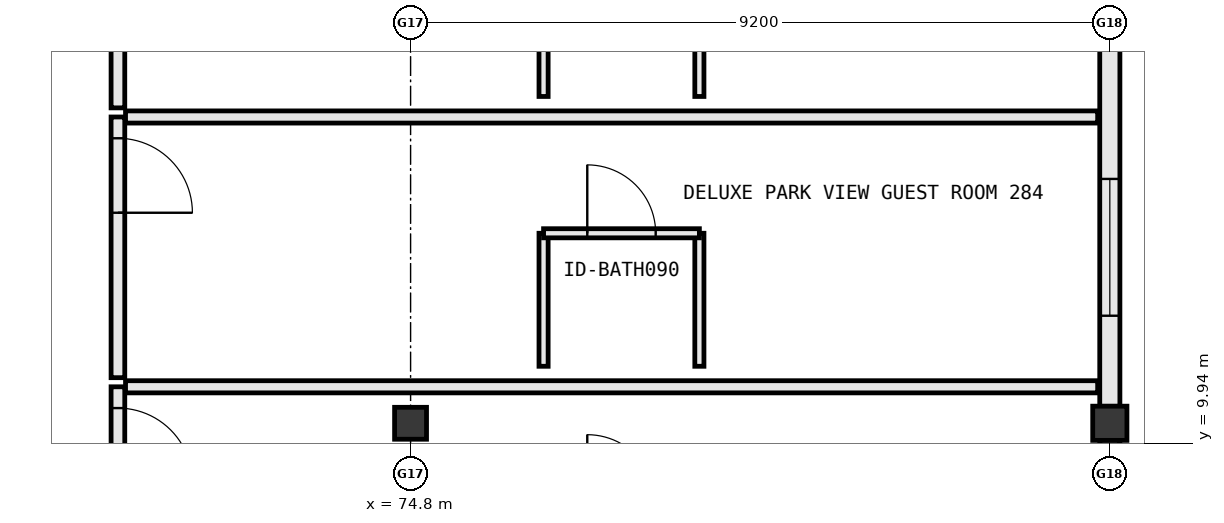
"""IFC4 building model, lengths in metres.
Left out: names, types, materials, properties, quantities, classifications, styles, units other than length and angle.
Written with IfcOpenShell. Run it as: python <this file> out.ifc"""

import sys

from ifc_helpers import new_model, si_unit, direction, frame, frame_2d, origin, origin_2d, place, context, subcontext, project, spatial, rectangle, extrude, element, fill, save


model = new_model("IFC4")
c1 = context("Model", 3, precision=1e-05, world=origin(), true_north=direction((0.0, 1.0)))
c2 = subcontext(c1, "Body", "Model", "MODEL_VIEW")
j1 = project(units=[si_unit("LENGTHUNIT", "METRE"), si_unit("PLANEANGLEUNIT", "RADIAN")], contexts=[c1])
p1 = place(None, origin())
s1 = spatial("IfcSite", under=j1, at=p1, CompositionType="ELEMENT")
p2 = place(p1, origin())
s2 = spatial("IfcBuilding", under=s1, at=p2, CompositionType="ELEMENT")
p3 = place(p2, frame((0.0, 0.0, 42.8)))
s3 = spatial("IfcBuildingStorey", under=s2, at=p3, CompositionType="ELEMENT", Elevation=42.8)
p4 = place(p3, frame((74.8, 10.2, 0.0), z_axis=(0.0, 0.0, 1.0), x_axis=(1.0, 0.0, 0.0)))
e1 = element("IfcColumn", 1, at=p4, inside=s3, PredefinedType="COLUMN", context=c2, shape_type="SweptSolid", body=[
    extrude(rectangle(XDim=0.42, YDim=0.42, at=origin_2d()), origin(), (0.0, 0.0, 1.0), 3.8),
])
p5 = place(p3, frame((84.0, 10.2, 0.0), z_axis=(0.0, 0.0, 1.0), x_axis=(1.0, 0.0, 0.0)))
e2 = element("IfcColumn", 2, at=p5, inside=s3, PredefinedType="COLUMN", context=c2, shape_type="SweptSolid", body=[
    extrude(rectangle(XDim=0.45, YDim=0.45, at=origin_2d()), origin(), (0.0, 0.0, 1.0), 3.8),
])
p6 = place(p3, frame((84.0, 0.823, 0.0), z_axis=(0.0, 0.0, 1.0), x_axis=(0.0, 1.0, 0.0)))
e3 = element("IfcWall", 3, at=p6, inside=s3, PredefinedType="STANDARD", context=c2, shape_type="SweptSolid", body=[
    extrude(rectangle(XDim=9.154, YDim=0.265, at=frame_2d((4.577, 0.0))), origin(), (0.0, 0.0, 1.0), 2.955),
])
p7 = place(p6, frame((0.479, 0.0, 0.85)))
e4 = element("IfcOpeningElement", 4, at=p7, cuts=e3, PredefinedType="OPENING", context=c2, shape_type="SweptSolid", body=[
    extrude(rectangle(XDim=1.8, YDim=1.85, at=frame_2d((0.9, 0.925))), frame((0.0, 0.145, 0.0), z_axis=(0.0, -1.0, 0.0), x_axis=(1.0, 0.0, 0.0)), (0.0, 0.0, 1.0), 0.289),
])
p8 = place(p6, frame((3.692, 0.0, 0.85)))
e5 = element("IfcOpeningElement", 5, at=p8, cuts=e3, PredefinedType="OPENING", context=c2, shape_type="SweptSolid", body=[
    extrude(rectangle(XDim=1.8, YDim=1.85, at=frame_2d((0.9, 0.925))), frame((0.0, 0.145, 0.0), z_axis=(0.0, -1.0, 0.0), x_axis=(1.0, 0.0, 0.0)), (0.0, 0.0, 1.0), 0.289),
])
p9 = place(p6, frame((6.89, 0.0, 0.85)))
e6 = element("IfcOpeningElement", 6, at=p9, cuts=e3, PredefinedType="OPENING", context=c2, shape_type="SweptSolid", body=[
    extrude(rectangle(XDim=1.8, YDim=1.85, at=frame_2d((0.9, 0.925))), frame((0.0, 0.145, 0.0), z_axis=(0.0, -1.0, 0.0), x_axis=(1.0, 0.0, 0.0)), (0.0, 0.0, 1.0), 0.289),
])
p10 = place(p3, frame((84.0, 10.423, 0.0), z_axis=(0.0, 0.0, 1.0), x_axis=(0.0, 1.0, 0.0)))
e7 = element("IfcWall", 7, at=p10, inside=s3, PredefinedType="STANDARD", context=c2, shape_type="SweptSolid", body=[
    extrude(rectangle(XDim=7.954, YDim=0.265, at=frame_2d((3.977, 0.0))), origin(), (0.0, 0.0, 1.0), 2.955),
])
p11 = place(p10, frame((1.192, 0.0, 0.85)))
e8 = element("IfcOpeningElement", 8, at=p11, cuts=e7, PredefinedType="OPENING", context=c2, shape_type="SweptSolid", body=[
    extrude(rectangle(XDim=1.8, YDim=1.85, at=frame_2d((0.9, 0.925))), frame((0.0, 0.145, 0.0), z_axis=(0.0, -1.0, 0.0), x_axis=(1.0, 0.0, 0.0)), (0.0, 0.0, 1.0), 0.289),
])
p12 = place(p10, frame((4.742, 0.0, 0.85)))
e9 = element("IfcOpeningElement", 9, at=p12, cuts=e7, PredefinedType="OPENING", context=c2, shape_type="SweptSolid", body=[
    extrude(rectangle(XDim=1.8, YDim=1.85, at=frame_2d((0.9, 0.925))), frame((0.0, 0.145, 0.0), z_axis=(0.0, -1.0, 0.0), x_axis=(1.0, 0.0, 0.0)), (0.0, 0.0, 1.0), 0.289),
])
p13 = place(p3, frame((70.95, 10.68, 0.0), z_axis=(0.0, 0.0, 1.0), x_axis=(0.0, -1.0, 0.0)))
e10 = element("IfcWall", 10, at=p13, inside=s3, PredefinedType="PARTITIONING", context=c2, shape_type="SweptSolid", body=[
    extrude(rectangle(XDim=3.43, YDim=0.18, at=frame_2d((1.715, 0.0))), origin(), (0.0, 0.0, 1.0), 3.54),
])
p14 = place(p13, frame((0.28, 0.0, 0.0)))
e11 = element("IfcOpeningElement", 11, at=p14, cuts=e10, PredefinedType="OPENING", context=c2, shape_type="SweptSolid", body=[
    extrude(rectangle(XDim=0.98, YDim=2.18, at=frame_2d((0.49, 1.09))), frame((0.0, 0.102, 0.0), z_axis=(0.0, -1.0, 0.0), x_axis=(1.0, 0.0, 0.0)), (0.0, 0.0, 1.0), 0.204),
])
p15 = place(p3, frame((71.05, 10.68, 0.0), z_axis=(0.0, 0.0, 1.0), x_axis=(1.0, 0.0, 0.0)))
e12 = element("IfcWall", 12, at=p15, inside=s3, PredefinedType="PARTITIONING", context=c2, shape_type="SweptSolid", body=[
    extrude(rectangle(XDim=12.79, YDim=0.16, at=frame_2d((6.395, 0.0))), origin(), (0.0, 0.0, 1.0), 3.54),
])
p16 = place(p3, frame((70.95, 14.23, 0.0), z_axis=(0.0, 0.0, 1.0), x_axis=(0.0, -1.0, 0.0)))
e13 = element("IfcWall", 13, at=p16, inside=s3, PredefinedType="PARTITIONING", context=c2, shape_type="SweptSolid", body=[
    extrude(rectangle(XDim=3.43, YDim=0.18, at=frame_2d((1.715, 0.0))), origin(), (0.0, 0.0, 1.0), 3.54),
])
p17 = place(p16, frame((0.28, 0.0, 0.0)))
e14 = element("IfcOpeningElement", 14, at=p17, cuts=e13, PredefinedType="OPENING", context=c2, shape_type="SweptSolid", body=[
    extrude(rectangle(XDim=0.98, YDim=2.18, at=frame_2d((0.49, 1.09))), frame((0.0, 0.102, 0.0), z_axis=(0.0, -1.0, 0.0), x_axis=(1.0, 0.0, 0.0)), (0.0, 0.0, 1.0), 0.204),
])
p18 = place(p3, frame((71.05, 14.23, 0.0), z_axis=(0.0, 0.0, 1.0), x_axis=(1.0, 0.0, 0.0)))
e15 = element("IfcWall", 15, at=p18, inside=s3, PredefinedType="PARTITIONING", context=c2, shape_type="SweptSolid", body=[
    extrude(rectangle(XDim=12.79, YDim=0.16, at=frame_2d((6.395, 0.0))), origin(), (0.0, 0.0, 1.0), 3.54),
])
for number, where, z_axis, x_axis in (
    (16, (76.55, 10.95, 0.0), (0.0, 0.0, 1.0), (0.0, 1.0, 0.0)),
    (17, (78.6, 10.95, 0.0), (0.0, 0.0, 1.0), (0.0, 1.0, 0.0)),
):
    element("IfcWall", number, at=place(p3, frame(where, z_axis=z_axis, x_axis=x_axis)), inside=s3, PredefinedType="PARTITIONING", context=c2, shape_type="SweptSolid", body=[
        extrude(rectangle(XDim=1.75, YDim=0.12, at=frame_2d((0.875, 0.0))), origin(), (0.0, 0.0, 1.0), 3.54),
    ])
p19 = place(p3, frame((76.55, 12.7, 0.0), z_axis=(0.0, 0.0, 1.0), x_axis=(1.0, 0.0, 0.0)))
e18 = element("IfcWall", 18, at=p19, inside=s3, PredefinedType="PARTITIONING", context=c2, shape_type="SweptSolid", body=[
    extrude(rectangle(XDim=2.05, YDim=0.12, at=frame_2d((1.025, 0.0))), origin(), (0.0, 0.0, 1.0), 3.54),
])
p20 = place(p19, frame((0.575, 0.0, 0.0)))
e19 = element("IfcOpeningElement", 19, at=p20, cuts=e18, PredefinedType="OPENING", context=c2, shape_type="SweptSolid", body=[
    extrude(rectangle(XDim=0.9, YDim=2.15, at=frame_2d((0.45, 1.075))), frame((0.0, 0.072, 0.0), z_axis=(0.0, -1.0, 0.0), x_axis=(1.0, 0.0, 0.0)), (0.0, 0.0, 1.0), 0.144),
])
p21 = place(p3, frame((70.95, 17.78, 0.0), z_axis=(0.0, 0.0, 1.0), x_axis=(0.0, -1.0, 0.0)))
e20 = element("IfcWall", 20, at=p21, inside=s3, PredefinedType="PARTITIONING", context=c2, shape_type="SweptSolid", body=[
    extrude(rectangle(XDim=3.43, YDim=0.18, at=frame_2d((1.715, 0.0))), origin(), (0.0, 0.0, 1.0), 3.54),
])
p22 = place(p21, frame((0.28, 0.0, 0.0)))
e21 = element("IfcOpeningElement", 21, at=p22, cuts=e20, PredefinedType="OPENING", context=c2, shape_type="SweptSolid", body=[
    extrude(rectangle(XDim=0.98, YDim=2.18, at=frame_2d((0.49, 1.09))), frame((0.0, 0.102, 0.0), z_axis=(0.0, -1.0, 0.0), x_axis=(1.0, 0.0, 0.0)), (0.0, 0.0, 1.0), 0.204),
])
for number, where, z_axis, x_axis in (
    (22, (76.55, 14.5, 0.0), (0.0, 0.0, 1.0), (0.0, 1.0, 0.0)),
    (23, (78.6, 14.5, 0.0), (0.0, 0.0, 1.0), (0.0, 1.0, 0.0)),
):
    element("IfcWall", number, at=place(p3, frame(where, z_axis=z_axis, x_axis=x_axis)), inside=s3, PredefinedType="PARTITIONING", context=c2, shape_type="SweptSolid", body=[
        extrude(rectangle(XDim=1.75, YDim=0.12, at=frame_2d((0.875, 0.0))), origin(), (0.0, 0.0, 1.0), 3.54),
    ])
p23 = place(p11, origin())
e24 = element("IfcWindow", 24, at=p23, inside=s3, PartitioningType="SINGLE_PANEL", PredefinedType="WINDOW", context=c2, shape_type="SweptSolid", body=[
    extrude(rectangle(XDim=1.8, YDim=1.85, at=frame_2d((0.9, 0.925))), frame((0.0, 0.03, 0.0), z_axis=(0.0, -1.0, 0.0), x_axis=(1.0, 0.0, 0.0)), (0.0, 0.0, 1.0), 0.06),
])
fill(e8, e24)
p24 = place(p14, origin())
e25 = element("IfcDoor", 25, at=p24, inside=s3, OperationType="SINGLE_SWING_RIGHT", PredefinedType="DOOR", context=c2, shape_type="SweptSolid", body=[
    extrude(rectangle(XDim=0.98, YDim=2.18, at=frame_2d((0.49, 1.09))), frame((0.0, 0.025, 0.0), z_axis=(0.0, -1.0, 0.0), x_axis=(1.0, 0.0, 0.0)), (0.0, 0.0, 1.0), 0.05),
])
fill(e11, e25)
p25 = place(p17, origin())
e26 = element("IfcDoor", 26, at=p25, inside=s3, OperationType="SINGLE_SWING_RIGHT", PredefinedType="DOOR", context=c2, shape_type="SweptSolid", body=[
    extrude(rectangle(XDim=0.98, YDim=2.18, at=frame_2d((0.49, 1.09))), frame((0.0, 0.025, 0.0), z_axis=(0.0, -1.0, 0.0), x_axis=(1.0, 0.0, 0.0)), (0.0, 0.0, 1.0), 0.05),
])
fill(e14, e26)
p26 = place(p20, origin())
e27 = element("IfcDoor", 27, at=p26, inside=s3, OperationType="SINGLE_SWING_LEFT", PredefinedType="DOOR", context=c2, shape_type="SweptSolid", body=[
    extrude(rectangle(XDim=0.9, YDim=2.15, at=frame_2d((0.45, 1.075))), frame((0.0, 0.025, 0.0), z_axis=(0.0, -1.0, 0.0), x_axis=(1.0, 0.0, 0.0)), (0.0, 0.0, 1.0), 0.05),
])
fill(e19, e27)
save(model, sys.argv[1])
